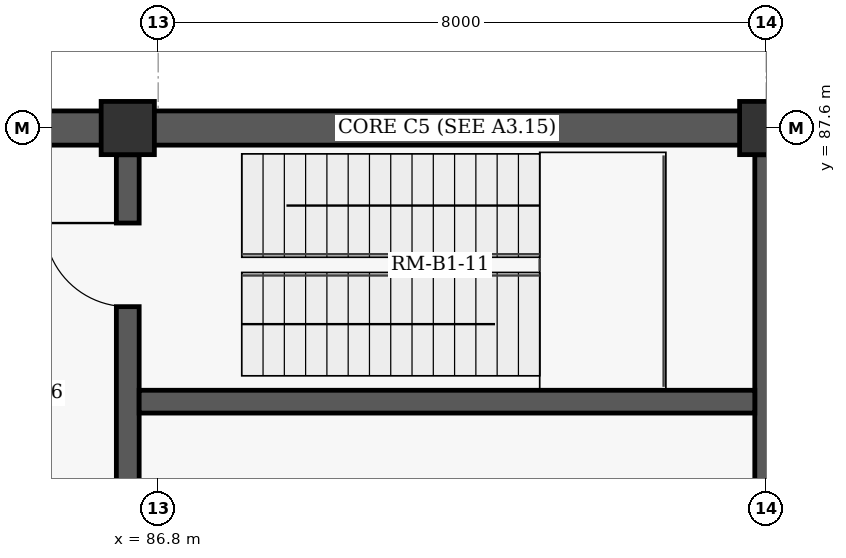
"""IFC4 building model, lengths in metres.
Left out: names, types, materials, properties, quantities, classifications, styles, units other than length and angle.
Written with IfcOpenShell. Run it as: python <this file> out.ifc"""

import sys

from ifc_helpers import new_model, si_unit, direction, frame, frame_2d, origin, origin_2d, place, context, subcontext, project, spatial, rectangle, extrude, element, fill, save


model = new_model("IFC4")
c1 = context("Model", 3, precision=1e-05, world=origin(), true_north=direction((0.0, 1.0)))
c2 = subcontext(c1, "Body", "Model", "MODEL_VIEW")
j1 = project(units=[si_unit("LENGTHUNIT", "METRE"), si_unit("PLANEANGLEUNIT", "RADIAN")], contexts=[c1])
p1 = place(None, origin())
s1 = spatial("IfcSite", under=j1, at=p1, CompositionType="ELEMENT")
p2 = place(p1, origin())
s2 = spatial("IfcBuilding", under=s1, at=p2, CompositionType="ELEMENT")
p3 = place(p2, frame((0.0, 0.0, -4.8)))
s3 = spatial("IfcBuildingStorey", under=s2, at=p3, CompositionType="ELEMENT", Elevation=-4.8)
for number, where, z_axis, x_axis in (
    (1, (86.4, 87.6, 0.0), (0.0, 0.0, 1.0), (1.0, 0.0, 0.0)),
    (2, (94.8, 87.6, 0.0), (0.0, 0.0, 1.0), (1.0, 0.0, 0.0)),
):
    element("IfcColumn", number, at=place(p3, frame(where, z_axis=z_axis, x_axis=x_axis)), inside=s3, PredefinedType="COLUMN", context=c2, shape_type="SweptSolid", body=[
        extrude(rectangle(XDim=0.7, YDim=0.7, at=origin_2d()), origin(), (0.0, 0.0, 1.0), 4.8),
    ])
p4 = place(p3, frame((54.8, 87.6, 0.0), z_axis=(0.0, 0.0, 1.0), x_axis=(1.0, 0.0, 0.0)))
e3 = element("IfcWall", 3, at=p4, inside=s3, PredefinedType="USERDEFINED", context=c2, shape_type="SweptSolid", body=[
    extrude(rectangle(XDim=84.6, YDim=0.45, at=frame_2d((42.3, 0.0))), origin(), (0.0, 0.0, 1.0), 3.67),
])
p5 = place(p3, frame((86.4, 79.952, 0.0), z_axis=(0.0, 0.0, 1.0), x_axis=(0.0, 1.0, 0.0)))
e4 = element("IfcWall", 4, at=p5, inside=s3, PredefinedType="SHEAR", context=c2, shape_type="SweptSolid", body=[
    extrude(rectangle(XDim=7.296, YDim=0.3, at=frame_2d((3.648, 0.0))), origin(), (0.0, 0.0, 1.0), 4.52),
])
p6 = place(p5, frame((5.298, 0.0, 0.0)))
e5 = element("IfcOpeningElement", 5, at=p6, cuts=e4, PredefinedType="OPENING", context=c2, shape_type="SweptSolid", body=[
    extrude(rectangle(XDim=1.1, YDim=2.15, at=frame_2d((0.55, 1.075))), frame((0.0, 0.16, 0.0), z_axis=(0.0, -1.0, 0.0), x_axis=(1.0, 0.0, 0.0)), (0.0, 0.0, 1.0), 0.32),
])
p7 = place(p5, frame((1.273, 0.0, 0.0)))
e6 = element("IfcOpeningElement", 6, at=p7, cuts=e4, PredefinedType="OPENING", context=c2, shape_type="SweptSolid", body=[
    extrude(rectangle(XDim=1.15, YDim=2.2, at=frame_2d((0.575, 1.1))), frame((0.0, 0.16, 0.0), z_axis=(0.0, -1.0, 0.0), x_axis=(1.0, 0.0, 0.0)), (0.0, 0.0, 1.0), 0.32),
])
p8 = place(p3, frame((94.8, 79.952, 0.0), z_axis=(0.0, 0.0, 1.0), x_axis=(0.0, 1.0, 0.0)))
e7 = element("IfcWall", 7, at=p8, inside=s3, PredefinedType="SHEAR", context=c2, shape_type="SweptSolid", body=[
    extrude(rectangle(XDim=7.296, YDim=0.3, at=frame_2d((3.648, 0.0))), origin(), (0.0, 0.0, 1.0), 4.52),
])
p9 = place(p3, frame((86.55, 84.0, 0.0), z_axis=(0.0, 0.0, 1.0), x_axis=(1.0, 0.0, 0.0)))
e8 = element("IfcWall", 8, at=p9, inside=s3, PredefinedType="SHEAR", context=c2, shape_type="SweptSolid", body=[
    extrude(rectangle(XDim=8.1, YDim=0.3, at=frame_2d((4.05, 0.0))), origin(), (0.0, 0.0, 1.0), 4.52),
])
p10 = place(p6, origin())
e9 = element("IfcDoor", 9, at=p10, inside=s3, OperationType="SINGLE_SWING_RIGHT", PredefinedType="DOOR", context=c2, shape_type="SweptSolid", body=[
    extrude(rectangle(XDim=1.1, YDim=2.15, at=frame_2d((0.55, 1.075))), frame((0.0, 0.025, 0.0), z_axis=(0.0, -1.0, 0.0), x_axis=(1.0, 0.0, 0.0)), (0.0, 0.0, 1.0), 0.05),
])
fill(e5, e9)
save(model, sys.argv[1])
